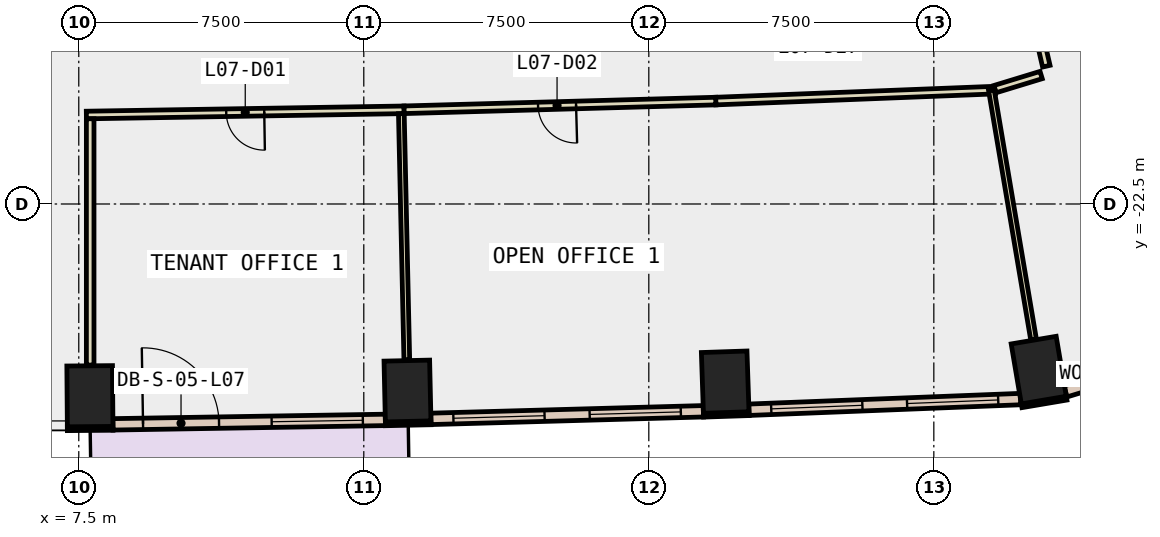
"""IFC4 building model, lengths in metres.
Left out: names, types, materials, properties, quantities, classifications, styles, units other than length and angle.
Written with IfcOpenShell. Run it as: python <this file> out.ifc"""

import sys

from ifc_helpers import new_model, si_unit, direction, frame, frame_2d, origin, origin_2d, place, context, subcontext, project, spatial, rectangle, extrude, element, fill, save


model = new_model("IFC4")
c1 = context("Model", 3, precision=1e-05, world=origin(), true_north=direction((0.0, 1.0)))
c2 = subcontext(c1, "Body", "Model", "MODEL_VIEW")
j1 = project(units=[si_unit("LENGTHUNIT", "METRE"), si_unit("PLANEANGLEUNIT", "RADIAN")], contexts=[c1])
p1 = place(None, origin())
s1 = spatial("IfcSite", under=j1, at=p1, CompositionType="ELEMENT")
p2 = place(p1, origin())
s2 = spatial("IfcBuilding", under=s1, at=p2, CompositionType="ELEMENT")
p3 = place(p2, frame((0.0, 0.0, 39.2)))
s3 = spatial("IfcBuildingStorey", under=s2, at=p3, CompositionType="ELEMENT", Elevation=39.2)
for number, where, z_axis, x_axis in (
    (1, (7.793, -27.558, -0.4), (0.0, 0.0, 1.0), (1.0, 0.008, 0.0)),
    (2, (16.15, -27.421, -0.4), (0.0, 0.0, 1.0), (1.0, 0.022, 0.0)),
    (3, (24.51, -27.188, -0.4), (0.0, 0.0, 1.0), (0.999, 0.034, 0.0)),
    (4, (32.761, -26.871, -0.4), (0.0, 0.0, 1.0), (0.986, 0.167, 0.0)),
):
    element("IfcColumn", number, at=place(p3, frame(where, z_axis=z_axis, x_axis=x_axis)), inside=s3, PredefinedType="COLUMN", context=c2, shape_type="SweptSolid", body=[
        extrude(rectangle(XDim=1.2, YDim=1.6, at=origin_2d()), origin(), (0.0, 0.0, 1.0), 4.2),
    ])
p4 = place(p3, frame((7.2, -28.413, 0.0), z_axis=(0.0, 0.0, 1.0), x_axis=(0.999965208912, 0.008341520563, 0.0)))
e5 = element("IfcWall", 5, at=p4, inside=s3, PredefinedType="STANDARD", context=c2, shape_type="SweptSolid", body=[
    extrude(rectangle(XDim=1.2, YDim=0.1, at=frame_2d((0.6, 0.0))), origin(), (0.0, 0.0, 1.0), 3.8),
])
p5 = place(p3, frame((15.569, -28.284, 0.0), z_axis=(0.0, 0.0, 1.0), x_axis=(0.99976752127, 0.021561618973, 0.0)))
e6 = element("IfcWall", 6, at=p5, inside=s3, PredefinedType="STANDARD", context=c2, shape_type="SweptSolid", body=[
    extrude(rectangle(XDim=1.2, YDim=0.1, at=frame_2d((0.6, 0.0))), origin(), (0.0, 0.0, 1.0), 3.8),
])
for number, where, z_axis, x_axis in (
    (7, (23.939, -28.057, 0.0), (0.0, 0.0, 1.0), (0.999, 0.033, 0.0)),
    (8, (32.311, -27.809, 0.0), (0.0, 0.0, 1.0), (0.986, 0.167, 0.0)),
):
    element("IfcWall", number, at=place(p3, frame(where, z_axis=z_axis, x_axis=x_axis)), inside=s3, PredefinedType="STANDARD", context=c2, shape_type="SweptSolid", body=[
        extrude(rectangle(XDim=1.2, YDim=0.1, at=frame_2d((0.6, 0.0))), origin(), (0.0, 0.0, 1.0), 3.8),
    ])
p6 = place(p3, frame((8.398, -28.298, 0.0), z_axis=(0.0, 0.0, 1.0), x_axis=(0.999866467443, 0.016341581408, 0.0)))
e9 = element("IfcWall", 9, at=p6, inside=s3, PredefinedType="STANDARD", context=c2, shape_type="SweptSolid", body=[
    extrude(rectangle(XDim=7.171, YDim=0.3, at=frame_2d((3.585, 0.0))), origin(), (0.0, 0.0, 1.0), 3.8),
])
p7 = place(p6, frame((0.793, 0.0, 0.0)))
e10 = element("IfcOpeningElement", 10, at=p7, cuts=e9, PredefinedType="OPENING", context=c2, shape_type="SweptSolid", body=[
    extrude(rectangle(XDim=2.0, YDim=2.4, at=frame_2d((1.0, 1.2))), frame((0.0, 0.16, 0.0), z_axis=(0.0, -1.0, 0.0), x_axis=(1.0, 0.0, 0.0)), (0.0, 0.0, 1.0), 0.32),
])
p8 = place(p6, frame((4.178, 0.0, 0.9)))
e11 = element("IfcOpeningElement", 11, at=p8, cuts=e9, PredefinedType="OPENING", context=c2, shape_type="SweptSolid", body=[
    extrude(rectangle(XDim=2.4, YDim=2.6, at=frame_2d((1.2, 1.3))), frame((0.0, 0.16, 0.0), z_axis=(0.0, -1.0, 0.0), x_axis=(1.0, 0.0, 0.0)), (0.0, 0.0, 1.0), 0.32),
])
p9 = place(p3, frame((16.765, -28.154, 0.0), z_axis=(0.0, 0.0, 1.0), x_axis=(0.999611502654, 0.02787191709, 0.0)))
e12 = element("IfcWall", 12, at=p9, inside=s3, PredefinedType="STANDARD", context=c2, shape_type="SweptSolid", body=[
    extrude(rectangle(XDim=7.174, YDim=0.3, at=frame_2d((3.587, 0.0))), origin(), (0.0, 0.0, 1.0), 3.8),
])
p10 = place(p9, frame((0.593, 0.0, 0.9)))
e13 = element("IfcOpeningElement", 13, at=p10, cuts=e12, PredefinedType="OPENING", context=c2, shape_type="SweptSolid", body=[
    extrude(rectangle(XDim=2.4, YDim=2.6, at=frame_2d((1.2, 1.3))), frame((0.0, 0.16, 0.0), z_axis=(0.0, -1.0, 0.0), x_axis=(1.0, 0.0, 0.0)), (0.0, 0.0, 1.0), 0.32),
])
p11 = place(p9, frame((4.18, 0.0, 0.9)))
e14 = element("IfcOpeningElement", 14, at=p11, cuts=e12, PredefinedType="OPENING", context=c2, shape_type="SweptSolid", body=[
    extrude(rectangle(XDim=2.4, YDim=2.6, at=frame_2d((1.2, 1.3))), frame((0.0, 0.16, 0.0), z_axis=(0.0, -1.0, 0.0), x_axis=(1.0, 0.0, 0.0)), (0.0, 0.0, 1.0), 0.32),
])
p12 = place(p3, frame((25.134, -27.914, 0.0), z_axis=(0.0, 0.0, 1.0), x_axis=(0.999228146648, 0.039282450878, 0.0)))
e15 = element("IfcWall", 15, at=p12, inside=s3, PredefinedType="STANDARD", context=c2, shape_type="SweptSolid", body=[
    extrude(rectangle(XDim=7.154, YDim=0.3, at=frame_2d((3.577, 0.0))), origin(), (0.0, 0.0, 1.0), 3.8),
])
p13 = place(p12, frame((0.588, 0.0, 0.9)))
e16 = element("IfcOpeningElement", 16, at=p13, cuts=e15, PredefinedType="OPENING", context=c2, shape_type="SweptSolid", body=[
    extrude(rectangle(XDim=2.4, YDim=2.6, at=frame_2d((1.2, 1.3))), frame((0.0, 0.16, 0.0), z_axis=(0.0, -1.0, 0.0), x_axis=(1.0, 0.0, 0.0)), (0.0, 0.0, 1.0), 0.32),
])
p14 = place(p12, frame((4.165, 0.0, 0.9)))
e17 = element("IfcOpeningElement", 17, at=p14, cuts=e15, PredefinedType="OPENING", context=c2, shape_type="SweptSolid", body=[
    extrude(rectangle(XDim=2.4, YDim=2.6, at=frame_2d((1.2, 1.3))), frame((0.0, 0.16, 0.0), z_axis=(0.0, -1.0, 0.0), x_axis=(1.0, 0.0, 0.0)), (0.0, 0.0, 1.0), 0.32),
])
p15 = place(p3, frame((33.464, -27.433, 0.0), z_axis=(0.0, 0.0, 1.0), x_axis=(0.95648967224, 0.291766185322, 0.0)))
e18 = element("IfcWall", 18, at=p15, inside=s3, PredefinedType="STANDARD", context=c2, shape_type="SweptSolid", body=[
    extrude(rectangle(XDim=3.181, YDim=0.3, at=frame_2d((1.591, 0.0))), origin(), (0.0, 0.0, 1.0), 3.8),
])
p16 = place(p15, frame((0.891, 0.0, 0.9)))
e19 = element("IfcOpeningElement", 19, at=p16, cuts=e18, PredefinedType="OPENING", context=c2, shape_type="SweptSolid", body=[
    extrude(rectangle(XDim=1.4, YDim=2.6, at=frame_2d((0.7, 1.3))), frame((0.0, 0.16, 0.0), z_axis=(0.0, -1.0, 0.0), x_axis=(1.0, 0.0, 0.0)), (0.0, 0.0, 1.0), 0.32),
])
p17 = place(p3, frame((16.061, -20.022, 0.0), z_axis=(0.0, 0.0, 1.0), x_axis=(-0.999865858466, -0.016378799504, 0.0)))
e20 = element("IfcWall", 20, at=p17, inside=s3, PredefinedType="PARTITIONING", context=c2, shape_type="SweptSolid", body=[
    extrude(rectangle(XDim=8.362, YDim=0.2, at=frame_2d((4.181, 0.0))), origin(), (0.0, 0.0, 1.0), 3.8),
])
p18 = place(p17, frame((3.681, 0.0, 0.0)))
e21 = element("IfcOpeningElement", 21, at=p18, cuts=e20, PredefinedType="OPENING", context=c2, shape_type="SweptSolid", body=[
    extrude(rectangle(XDim=1.0, YDim=2.1, at=frame_2d((0.5, 1.05))), frame((0.0, 0.11, 0.0), z_axis=(0.0, -1.0, 0.0), x_axis=(1.0, 0.0, 0.0)), (0.0, 0.0, 1.0), 0.22),
])
p19 = place(p3, frame((31.615, -19.503, 0.0), z_axis=(0.0, 0.0, 1.0), x_axis=(-0.999228381006, -0.039276489048, 0.0)))
e22 = element("IfcWall", 22, at=p19, inside=s3, PredefinedType="PARTITIONING", context=c2, shape_type="SweptSolid", body=[
    extrude(rectangle(XDim=7.36, YDim=0.2, at=frame_2d((3.68, 0.0))), origin(), (0.0, 0.0, 1.0), 3.8),
])
p20 = place(p3, frame((24.261, -19.792, 0.0), z_axis=(0.0, 0.0, 1.0), x_axis=(-0.999610256124, -0.027916587377, 0.0)))
e23 = element("IfcWall", 23, at=p20, inside=s3, PredefinedType="PARTITIONING", context=c2, shape_type="SweptSolid", body=[
    extrude(rectangle(XDim=8.203, YDim=0.2, at=frame_2d((4.102, 0.0))), origin(), (0.0, 0.0, 1.0), 3.8),
])
p21 = place(p20, frame((3.677, 0.0, 0.0)))
e24 = element("IfcOpeningElement", 24, at=p21, cuts=e23, PredefinedType="OPENING", context=c2, shape_type="SweptSolid", body=[
    extrude(rectangle(XDim=1.0, YDim=2.1, at=frame_2d((0.5, 1.05))), frame((0.0, 0.11, 0.0), z_axis=(0.0, -1.0, 0.0), x_axis=(1.0, 0.0, 0.0)), (0.0, 0.0, 1.0), 0.22),
])
p22 = place(p3, frame((32.65, -17.538, 0.0), z_axis=(0.0, 0.0, 1.0), x_axis=(0.226081445763, -0.974108402531, 0.0)))
e25 = element("IfcWall", 25, at=p22, inside=s3, PredefinedType="PARTITIONING", context=c2, shape_type="SweptSolid", body=[
    extrude(rectangle(XDim=1.371, YDim=0.2, at=frame_2d((0.686, 0.0))), origin(), (0.0, 0.0, 1.0), 3.8),
])
p23 = place(p3, frame((32.824, -19.107, 0.0), z_axis=(0.0, 0.0, 1.0), x_axis=(-0.956459113118, -0.291866347723, 0.0)))
e26 = element("IfcWall", 26, at=p23, inside=s3, PredefinedType="PARTITIONING", context=c2, shape_type="SweptSolid", body=[
    extrude(rectangle(XDim=1.268, YDim=0.2, at=frame_2d((0.634, 0.0))), origin(), (0.0, 0.0, 1.0), 3.8),
])
p24 = place(p3, frame((7.8, -20.257, 0.0), z_axis=(0.0, 0.0, 1.0), x_axis=(0.0, -1.0, 0.0)))
e27 = element("IfcWall", 27, at=p24, inside=s3, PredefinedType="PARTITIONING", context=c2, shape_type="SweptSolid", body=[
    extrude(rectangle(XDim=6.481, YDim=0.2, at=frame_2d((3.24, 0.0))), origin(), (0.0, 0.0, 1.0), 3.8),
])
p25 = place(p3, frame((15.988, -20.123, 0.0), z_axis=(0.0, 0.0, 1.0), x_axis=(0.022230127358, -0.999752880185, 0.0)))
e28 = element("IfcWall", 28, at=p25, inside=s3, PredefinedType="PARTITIONING", context=c2, shape_type="SweptSolid", body=[
    extrude(rectangle(XDim=6.48, YDim=0.15, at=frame_2d((3.24, 0.0))), origin(), (0.0, 0.0, 1.0), 3.8),
])
p26 = place(p3, frame((31.515, -19.506, 0.0), z_axis=(0.0, 0.0, 1.0), x_axis=(0.166785823947, -0.985993148521, 0.0)))
e29 = element("IfcWall", 29, at=p26, inside=s3, PredefinedType="PARTITIONING", context=c2, shape_type="SweptSolid", body=[
    extrude(rectangle(XDim=6.65, YDim=0.15, at=frame_2d((3.325, 0.0))), origin(), (0.0, 0.0, 1.0), 3.8),
])
p27 = place(p7, origin())
e30 = element("IfcDoor", 30, at=p27, inside=s3, OperationType="SLIDING_TO_LEFT", PredefinedType="DOOR", context=c2, shape_type="SweptSolid", body=[
    extrude(rectangle(XDim=2.0, YDim=2.4, at=frame_2d((1.0, 1.2))), frame((0.0, 0.025, 0.0), z_axis=(0.0, -1.0, 0.0), x_axis=(1.0, 0.0, 0.0)), (0.0, 0.0, 1.0), 0.05),
])
fill(e10, e30)
p28 = place(p8, origin())
e31 = element("IfcWindow", 31, at=p28, inside=s3, PartitioningType="SINGLE_PANEL", PredefinedType="WINDOW", context=c2, shape_type="SweptSolid", body=[
    extrude(rectangle(XDim=2.4, YDim=2.6, at=frame_2d((1.2, 1.3))), frame((0.0, 0.03, 0.0), z_axis=(0.0, -1.0, 0.0), x_axis=(1.0, 0.0, 0.0)), (0.0, 0.0, 1.0), 0.06),
])
fill(e11, e31)
p29 = place(p10, origin())
e32 = element("IfcWindow", 32, at=p29, inside=s3, PartitioningType="SINGLE_PANEL", PredefinedType="WINDOW", context=c2, shape_type="SweptSolid", body=[
    extrude(rectangle(XDim=2.4, YDim=2.6, at=frame_2d((1.2, 1.3))), frame((0.0, 0.03, 0.0), z_axis=(0.0, -1.0, 0.0), x_axis=(1.0, 0.0, 0.0)), (0.0, 0.0, 1.0), 0.06),
])
fill(e13, e32)
p30 = place(p11, origin())
e33 = element("IfcWindow", 33, at=p30, inside=s3, PartitioningType="SINGLE_PANEL", PredefinedType="WINDOW", context=c2, shape_type="SweptSolid", body=[
    extrude(rectangle(XDim=2.4, YDim=2.6, at=frame_2d((1.2, 1.3))), frame((0.0, 0.03, 0.0), z_axis=(0.0, -1.0, 0.0), x_axis=(1.0, 0.0, 0.0)), (0.0, 0.0, 1.0), 0.06),
])
fill(e14, e33)
p31 = place(p13, origin())
e34 = element("IfcWindow", 34, at=p31, inside=s3, PartitioningType="SINGLE_PANEL", PredefinedType="WINDOW", context=c2, shape_type="SweptSolid", body=[
    extrude(rectangle(XDim=2.4, YDim=2.6, at=frame_2d((1.2, 1.3))), frame((0.0, 0.03, 0.0), z_axis=(0.0, -1.0, 0.0), x_axis=(1.0, 0.0, 0.0)), (0.0, 0.0, 1.0), 0.06),
])
fill(e16, e34)
p32 = place(p14, origin())
e35 = element("IfcWindow", 35, at=p32, inside=s3, PartitioningType="SINGLE_PANEL", PredefinedType="WINDOW", context=c2, shape_type="SweptSolid", body=[
    extrude(rectangle(XDim=2.4, YDim=2.6, at=frame_2d((1.2, 1.3))), frame((0.0, 0.03, 0.0), z_axis=(0.0, -1.0, 0.0), x_axis=(1.0, 0.0, 0.0)), (0.0, 0.0, 1.0), 0.06),
])
fill(e17, e35)
p33 = place(p18, origin())
e36 = element("IfcDoor", 36, at=p33, inside=s3, OperationType="SINGLE_SWING_RIGHT", PredefinedType="DOOR", context=c2, shape_type="SweptSolid", body=[
    extrude(rectangle(XDim=1.0, YDim=2.1, at=frame_2d((0.5, 1.05))), frame((0.0, 0.025, 0.0), z_axis=(0.0, -1.0, 0.0), x_axis=(1.0, 0.0, 0.0)), (0.0, 0.0, 1.0), 0.05),
])
fill(e21, e36)
p34 = place(p21, origin())
e37 = element("IfcDoor", 37, at=p34, inside=s3, OperationType="SINGLE_SWING_RIGHT", PredefinedType="DOOR", context=c2, shape_type="SweptSolid", body=[
    extrude(rectangle(XDim=1.0, YDim=2.1, at=frame_2d((0.5, 1.05))), frame((0.0, 0.025, 0.0), z_axis=(0.0, -1.0, 0.0), x_axis=(1.0, 0.0, 0.0)), (0.0, 0.0, 1.0), 0.05),
])
fill(e24, e37)
save(model, sys.argv[1])
